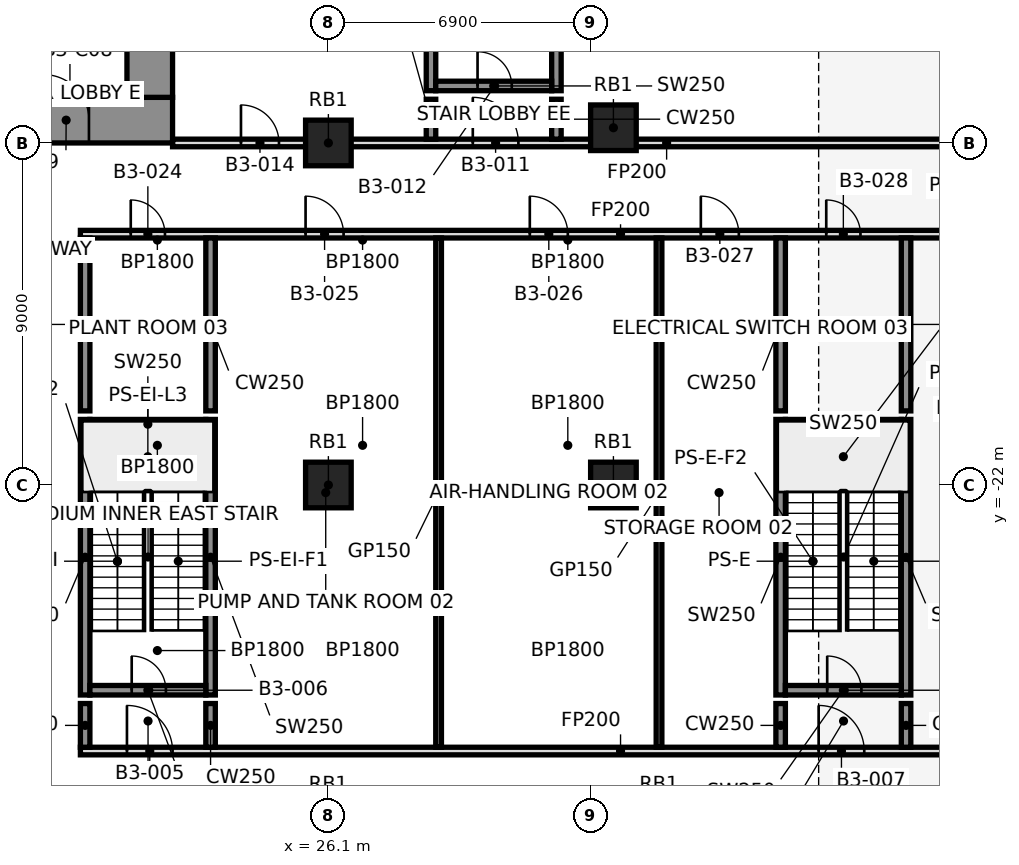
"""IFC4 building model, lengths in metres.
Left out: names, types, materials, properties, quantities, classifications, styles, units other than length and angle.
Written with IfcOpenShell. Run it as: python <this file> out.ifc"""

import sys

from ifc_helpers import new_model, si_unit, direction, frame, frame_2d, origin, origin_2d, place, context, subcontext, project, spatial, rectangle, extrude, element, fill, save


model = new_model("IFC4")
c1 = context("Model", 3, precision=1e-05, world=origin(), true_north=direction((0.0, 1.0)))
c2 = subcontext(c1, "Body", "Model", "MODEL_VIEW")
j1 = project(units=[si_unit("LENGTHUNIT", "METRE"), si_unit("PLANEANGLEUNIT", "RADIAN")], contexts=[c1])
p1 = place(None, origin())
s1 = spatial("IfcSite", under=j1, at=p1, CompositionType="ELEMENT")
p2 = place(p1, origin())
s2 = spatial("IfcBuilding", under=s1, at=p2, CompositionType="ELEMENT")
p3 = place(p2, frame((0.0, 0.0, -15.0)))
s3 = spatial("IfcBuildingStorey", under=s2, at=p3, CompositionType="ELEMENT", Elevation=-15.0)
for number, where, z_axis, x_axis in (
    (1, (33.6, -12.6, 0.0), (0.0, 0.0, 1.0), (1.0, 0.0, 0.0)),
    (2, (33.6, -22.0, 0.0), (0.0, 0.0, 1.0), (1.0, 0.0, 0.0)),
    (3, (26.1, -22.0, 0.0), (0.0, 0.0, 1.0), (1.0, 0.0, 0.0)),
    (4, (26.1, -13.0, 0.0), (0.0, 0.0, 1.0), (1.0, 0.0, 0.0)),
):
    element("IfcColumn", number, at=place(p3, frame(where, z_axis=z_axis, x_axis=x_axis)), inside=s3, PredefinedType="COLUMN", context=c2, shape_type="SweptSolid", body=[
        extrude(rectangle(XDim=1.2, YDim=1.2, at=origin_2d()), origin(), (0.0, 0.0, 1.0), 5.0),
    ])
for number, where, z_axis, x_axis in (
    (5, (28.8, -11.625, 0.0), (0.0, 0.0, 1.0), (0.0, 1.0, 0.0)),
    (6, (32.1, -11.625, 0.0), (0.0, 0.0, 1.0), (0.0, 1.0, 0.0)),
):
    element("IfcWall", number, at=place(p3, frame(where, z_axis=z_axis, x_axis=x_axis)), inside=s3, PredefinedType="SHEAR", context=c2, shape_type="SweptSolid", body=[
        extrude(rectangle(XDim=7.25, YDim=0.25, at=frame_2d((3.625, 0.0))), origin(), (0.0, 0.0, 1.0), 5.0),
    ])
p4 = place(p3, frame((28.925, -11.5, 0.0), z_axis=(0.0, 0.0, 1.0), x_axis=(1.0, 0.0, 0.0)))
e7 = element("IfcWall", 7, at=p4, inside=s3, PredefinedType="SHEAR", context=c2, shape_type="SweptSolid", body=[
    extrude(rectangle(XDim=3.05, YDim=0.25, at=frame_2d((1.525, 0.0))), origin(), (0.0, 0.0, 1.0), 5.0),
])
p5 = place(p4, frame((1.1, 0.0, 0.0)))
e8 = element("IfcOpeningElement", 8, at=p5, cuts=e7, PredefinedType="OPENING", context=c2, shape_type="SweptSolid", body=[
    extrude(rectangle(XDim=0.9, YDim=2.1, at=frame_2d((0.45, 1.05))), frame((0.0, 0.137, 0.0), z_axis=(0.0, -1.0, 0.0), x_axis=(1.0, 0.0, 0.0)), (0.0, 0.0, 1.0), 0.274),
])
for number, where, z_axis, x_axis in (
    (9, (19.7, -27.525, 0.0), (0.0, 0.0, 1.0), (0.0, 1.0, 0.0)),
    (10, (23.0, -27.525, 0.0), (0.0, 0.0, 1.0), (0.0, 1.0, 0.0)),
):
    element("IfcWall", number, at=place(p3, frame(where, z_axis=z_axis, x_axis=x_axis)), inside=s3, PredefinedType="SHEAR", context=c2, shape_type="SweptSolid", body=[
        extrude(rectangle(XDim=7.25, YDim=0.25, at=frame_2d((3.625, 0.0))), origin(), (0.0, 0.0, 1.0), 5.0),
    ])
p6 = place(p3, frame((19.825, -27.4, 0.0), z_axis=(0.0, 0.0, 1.0), x_axis=(1.0, 0.0, 0.0)))
e11 = element("IfcWall", 11, at=p6, inside=s3, PredefinedType="SHEAR", context=c2, shape_type="SweptSolid", body=[
    extrude(rectangle(XDim=3.05, YDim=0.25, at=frame_2d((1.525, 0.0))), origin(), (0.0, 0.0, 1.0), 5.0),
])
p7 = place(p6, frame((1.1, 0.0, 0.0)))
e12 = element("IfcOpeningElement", 12, at=p7, cuts=e11, PredefinedType="OPENING", context=c2, shape_type="SweptSolid", body=[
    extrude(rectangle(XDim=0.9, YDim=2.1, at=frame_2d((0.45, 1.05))), frame((0.0, 0.137, 0.0), z_axis=(0.0, -1.0, 0.0), x_axis=(1.0, 0.0, 0.0)), (0.0, 0.0, 1.0), 0.274),
])
p8 = place(p3, frame((19.825, -20.4, 0.0), z_axis=(0.0, 0.0, 1.0), x_axis=(1.0, 0.0, 0.0)))
e13 = element("IfcWall", 13, at=p8, inside=s3, PredefinedType="SHEAR", context=c2, shape_type="SweptSolid", body=[
    extrude(rectangle(XDim=3.05, YDim=0.25, at=frame_2d((1.525, 0.0))), origin(), (0.0, 0.0, 1.0), 5.0),
])
for number, where, z_axis, x_axis in (
    (14, (38.0, -27.525, 0.0), (0.0, 0.0, 1.0), (0.0, 1.0, 0.0)),
    (15, (41.3, -27.525, 0.0), (0.0, 0.0, 1.0), (0.0, 1.0, 0.0)),
):
    element("IfcWall", number, at=place(p3, frame(where, z_axis=z_axis, x_axis=x_axis)), inside=s3, PredefinedType="SHEAR", context=c2, shape_type="SweptSolid", body=[
        extrude(rectangle(XDim=7.25, YDim=0.25, at=frame_2d((3.625, 0.0))), origin(), (0.0, 0.0, 1.0), 5.0),
    ])
p9 = place(p3, frame((38.125, -27.4, 0.0), z_axis=(0.0, 0.0, 1.0), x_axis=(1.0, 0.0, 0.0)))
e16 = element("IfcWall", 16, at=p9, inside=s3, PredefinedType="SHEAR", context=c2, shape_type="SweptSolid", body=[
    extrude(rectangle(XDim=3.05, YDim=0.25, at=frame_2d((1.525, 0.0))), origin(), (0.0, 0.0, 1.0), 5.0),
])
p10 = place(p9, frame((1.1, 0.0, 0.0)))
e17 = element("IfcOpeningElement", 17, at=p10, cuts=e16, PredefinedType="OPENING", context=c2, shape_type="SweptSolid", body=[
    extrude(rectangle(XDim=0.9, YDim=2.1, at=frame_2d((0.45, 1.05))), frame((0.0, 0.137, 0.0), z_axis=(0.0, -1.0, 0.0), x_axis=(1.0, 0.0, 0.0)), (0.0, 0.0, 1.0), 0.274),
])
p11 = place(p3, frame((38.125, -20.4, 0.0), z_axis=(0.0, 0.0, 1.0), x_axis=(1.0, 0.0, 0.0)))
e18 = element("IfcWall", 18, at=p11, inside=s3, PredefinedType="SHEAR", context=c2, shape_type="SweptSolid", body=[
    extrude(rectangle(XDim=3.05, YDim=0.25, at=frame_2d((1.525, 0.0))), origin(), (0.0, 0.0, 1.0), 5.0),
])
p12 = place(p3, frame((19.575, -29.0, 0.0), z_axis=(0.0, 0.0, 1.0), x_axis=(1.0, 0.0, 0.0)))
e19 = element("IfcWall", 19, at=p12, inside=s3, PredefinedType="PARTITIONING", context=c2, shape_type="SweptSolid", body=[
    extrude(rectangle(XDim=28.425, YDim=0.2, at=frame_2d((14.212, 0.0))), origin(), (0.0, 0.0, 1.0), 4.7),
])
p13 = place(p12, frame((1.225, 0.0, 0.0)))
e20 = element("IfcOpeningElement", 20, at=p13, cuts=e19, PredefinedType="OPENING", context=c2, shape_type="SweptSolid", body=[
    extrude(rectangle(XDim=1.2, YDim=2.1, at=frame_2d((0.6, 1.05))), frame((0.0, 0.112, 0.0), z_axis=(0.0, -1.0, 0.0), x_axis=(1.0, 0.0, 0.0)), (0.0, 0.0, 1.0), 0.224),
])
p14 = place(p12, frame((19.425, 0.0, 0.0)))
e21 = element("IfcOpeningElement", 21, at=p14, cuts=e19, PredefinedType="OPENING", context=c2, shape_type="SweptSolid", body=[
    extrude(rectangle(XDim=1.2, YDim=2.1, at=frame_2d((0.6, 1.05))), frame((0.0, 0.112, 0.0), z_axis=(0.0, -1.0, 0.0), x_axis=(1.0, 0.0, 0.0)), (0.0, 0.0, 1.0), 0.224),
])
p15 = place(p3, frame((19.575, -15.4, 0.0), z_axis=(0.0, 0.0, 1.0), x_axis=(1.0, 0.0, 0.0)))
e22 = element("IfcWall", 22, at=p15, inside=s3, PredefinedType="PARTITIONING", context=c2, shape_type="SweptSolid", body=[
    extrude(rectangle(XDim=28.425, YDim=0.2, at=frame_2d((14.212, 0.0))), origin(), (0.0, 0.0, 1.0), 4.7),
])
p16 = place(p15, frame((1.325, 0.0, 0.0)))
e23 = element("IfcOpeningElement", 23, at=p16, cuts=e22, PredefinedType="OPENING", context=c2, shape_type="SweptSolid", body=[
    extrude(rectangle(XDim=0.9, YDim=2.1, at=frame_2d((0.45, 1.05))), frame((0.0, 0.112, 0.0), z_axis=(0.0, -1.0, 0.0), x_axis=(1.0, 0.0, 0.0)), (0.0, 0.0, 1.0), 0.224),
])
p17 = place(p15, frame((5.925, 0.0, 0.0)))
e24 = element("IfcOpeningElement", 24, at=p17, cuts=e22, PredefinedType="OPENING", context=c2, shape_type="SweptSolid", body=[
    extrude(rectangle(XDim=1.0, YDim=2.1, at=frame_2d((0.5, 1.05))), frame((0.0, 0.112, 0.0), z_axis=(0.0, -1.0, 0.0), x_axis=(1.0, 0.0, 0.0)), (0.0, 0.0, 1.0), 0.224),
])
p18 = place(p15, frame((11.825, 0.0, 0.0)))
e25 = element("IfcOpeningElement", 25, at=p18, cuts=e22, PredefinedType="OPENING", context=c2, shape_type="SweptSolid", body=[
    extrude(rectangle(XDim=1.0, YDim=2.1, at=frame_2d((0.5, 1.05))), frame((0.0, 0.112, 0.0), z_axis=(0.0, -1.0, 0.0), x_axis=(1.0, 0.0, 0.0)), (0.0, 0.0, 1.0), 0.224),
])
p19 = place(p15, frame((16.325, 0.0, 0.0)))
e26 = element("IfcOpeningElement", 26, at=p19, cuts=e22, PredefinedType="OPENING", context=c2, shape_type="SweptSolid", body=[
    extrude(rectangle(XDim=1.0, YDim=2.1, at=frame_2d((0.5, 1.05))), frame((0.0, 0.112, 0.0), z_axis=(0.0, -1.0, 0.0), x_axis=(1.0, 0.0, 0.0)), (0.0, 0.0, 1.0), 0.224),
])
p20 = place(p15, frame((19.625, 0.0, 0.0)))
e27 = element("IfcOpeningElement", 27, at=p20, cuts=e22, PredefinedType="OPENING", context=c2, shape_type="SweptSolid", body=[
    extrude(rectangle(XDim=0.9, YDim=2.1, at=frame_2d((0.45, 1.05))), frame((0.0, 0.112, 0.0), z_axis=(0.0, -1.0, 0.0), x_axis=(1.0, 0.0, 0.0)), (0.0, 0.0, 1.0), 0.224),
])
p21 = place(p15, frame((24.525, 0.0, 0.0)))
e28 = element("IfcOpeningElement", 28, at=p21, cuts=e22, PredefinedType="OPENING", context=c2, shape_type="SweptSolid", body=[
    extrude(rectangle(XDim=1.0, YDim=2.1, at=frame_2d((0.5, 1.05))), frame((0.0, 0.112, 0.0), z_axis=(0.0, -1.0, 0.0), x_axis=(1.0, 0.0, 0.0)), (0.0, 0.0, 1.0), 0.224),
])
p22 = place(p3, frame((22.0, -13.0, 0.0), z_axis=(0.0, 0.0, 1.0), x_axis=(1.0, 0.0, 0.0)))
e29 = element("IfcWall", 29, at=p22, inside=s3, PredefinedType="PARTITIONING", context=c2, shape_type="SweptSolid", body=[
    extrude(rectangle(XDim=26.0, YDim=0.2, at=frame_2d((13.0, 0.0))), origin(), (0.0, 0.0, 1.0), 4.7),
])
p23 = place(p22, frame((7.9, 0.0, 0.0)))
e30 = element("IfcOpeningElement", 30, at=p23, cuts=e29, PredefinedType="OPENING", context=c2, shape_type="SweptSolid", body=[
    extrude(rectangle(XDim=1.2, YDim=2.1, at=frame_2d((0.6, 1.05))), frame((0.0, 0.112, 0.0), z_axis=(0.0, -1.0, 0.0), x_axis=(1.0, 0.0, 0.0)), (0.0, 0.0, 1.0), 0.224),
])
p24 = place(p22, frame((1.8, 0.0, 0.0)))
e31 = element("IfcOpeningElement", 31, at=p24, cuts=e29, PredefinedType="OPENING", context=c2, shape_type="SweptSolid", body=[
    extrude(rectangle(XDim=1.0, YDim=2.1, at=frame_2d((0.5, 1.05))), frame((0.0, 0.112, 0.0), z_axis=(0.0, -1.0, 0.0), x_axis=(1.0, 0.0, 0.0)), (0.0, 0.0, 1.0), 0.224),
])
p25 = place(p3, frame((19.7, -28.9, 0.0), z_axis=(0.0, 0.0, 1.0), x_axis=(0.0, 1.0, 0.0)))
e32 = element("IfcWall", 32, at=p25, inside=s3, PredefinedType="SHEAR", context=c2, shape_type="SweptSolid", body=[
    extrude(rectangle(XDim=1.15, YDim=0.25, at=frame_2d((0.575, 0.0))), origin(), (0.0, 0.0, 1.0), 5.0),
])
p26 = place(p3, frame((19.7, -20.05, 0.0), z_axis=(0.0, 0.0, 1.0), x_axis=(0.0, 1.0, 0.0)))
e33 = element("IfcWall", 33, at=p26, inside=s3, PredefinedType="SHEAR", context=c2, shape_type="SweptSolid", body=[
    extrude(rectangle(XDim=4.55, YDim=0.25, at=frame_2d((2.275, 0.0))), origin(), (0.0, 0.0, 1.0), 5.0),
])
p27 = place(p3, frame((23.0, -28.9, 0.0), z_axis=(0.0, 0.0, 1.0), x_axis=(0.0, 1.0, 0.0)))
e34 = element("IfcWall", 34, at=p27, inside=s3, PredefinedType="SHEAR", context=c2, shape_type="SweptSolid", body=[
    extrude(rectangle(XDim=1.15, YDim=0.25, at=frame_2d((0.575, 0.0))), origin(), (0.0, 0.0, 1.0), 5.0),
])
p28 = place(p3, frame((23.0, -20.05, 0.0), z_axis=(0.0, 0.0, 1.0), x_axis=(0.0, 1.0, 0.0)))
e35 = element("IfcWall", 35, at=p28, inside=s3, PredefinedType="SHEAR", context=c2, shape_type="SweptSolid", body=[
    extrude(rectangle(XDim=4.55, YDim=0.25, at=frame_2d((2.275, 0.0))), origin(), (0.0, 0.0, 1.0), 5.0),
])
p29 = place(p3, frame((28.8, -12.9, 0.0), z_axis=(0.0, 0.0, 1.0), x_axis=(0.0, 1.0, 0.0)))
e36 = element("IfcWall", 36, at=p29, inside=s3, PredefinedType="SHEAR", context=c2, shape_type="SweptSolid", body=[
    extrude(rectangle(XDim=1.05, YDim=0.25, at=frame_2d((0.525, 0.0))), origin(), (0.0, 0.0, 1.0), 5.0),
])
p30 = place(p3, frame((29.0, -28.9, 0.0), z_axis=(0.0, 0.0, 1.0), x_axis=(0.0, 1.0, 0.0)))
e37 = element("IfcWall", 37, at=p30, inside=s3, PredefinedType="PARTITIONING", context=c2, shape_type="SweptSolid", body=[
    extrude(rectangle(XDim=13.4, YDim=0.15, at=frame_2d((6.7, 0.0))), origin(), (0.0, 0.0, 1.0), 4.7),
])
p31 = place(p3, frame((32.1, -12.9, 0.0), z_axis=(0.0, 0.0, 1.0), x_axis=(0.0, 1.0, 0.0)))
e38 = element("IfcWall", 38, at=p31, inside=s3, PredefinedType="SHEAR", context=c2, shape_type="SweptSolid", body=[
    extrude(rectangle(XDim=1.05, YDim=0.25, at=frame_2d((0.525, 0.0))), origin(), (0.0, 0.0, 1.0), 5.0),
])
p32 = place(p3, frame((34.8, -28.9, 0.0), z_axis=(0.0, 0.0, 1.0), x_axis=(0.0, 1.0, 0.0)))
e39 = element("IfcWall", 39, at=p32, inside=s3, PredefinedType="PARTITIONING", context=c2, shape_type="SweptSolid", body=[
    extrude(rectangle(XDim=13.4, YDim=0.15, at=frame_2d((6.7, 0.0))), origin(), (0.0, 0.0, 1.0), 4.7),
])
p33 = place(p3, frame((38.0, -28.9, 0.0), z_axis=(0.0, 0.0, 1.0), x_axis=(0.0, 1.0, 0.0)))
e40 = element("IfcWall", 40, at=p33, inside=s3, PredefinedType="SHEAR", context=c2, shape_type="SweptSolid", body=[
    extrude(rectangle(XDim=1.15, YDim=0.25, at=frame_2d((0.575, 0.0))), origin(), (0.0, 0.0, 1.0), 5.0),
])
p34 = place(p3, frame((38.0, -20.05, 0.0), z_axis=(0.0, 0.0, 1.0), x_axis=(0.0, 1.0, 0.0)))
e41 = element("IfcWall", 41, at=p34, inside=s3, PredefinedType="SHEAR", context=c2, shape_type="SweptSolid", body=[
    extrude(rectangle(XDim=4.55, YDim=0.25, at=frame_2d((2.275, 0.0))), origin(), (0.0, 0.0, 1.0), 5.0),
])
p35 = place(p3, frame((41.3, -28.9, 0.0), z_axis=(0.0, 0.0, 1.0), x_axis=(0.0, 1.0, 0.0)))
e42 = element("IfcWall", 42, at=p35, inside=s3, PredefinedType="SHEAR", context=c2, shape_type="SweptSolid", body=[
    extrude(rectangle(XDim=1.15, YDim=0.25, at=frame_2d((0.575, 0.0))), origin(), (0.0, 0.0, 1.0), 5.0),
])
p36 = place(p3, frame((41.3, -20.05, 0.0), z_axis=(0.0, 0.0, 1.0), x_axis=(0.0, 1.0, 0.0)))
e43 = element("IfcWall", 43, at=p36, inside=s3, PredefinedType="SHEAR", context=c2, shape_type="SweptSolid", body=[
    extrude(rectangle(XDim=4.55, YDim=0.25, at=frame_2d((2.275, 0.0))), origin(), (0.0, 0.0, 1.0), 5.0),
])
p37 = place(p3, frame((-22.0, -12.4, 0.0), z_axis=(0.0, 0.0, 1.0), x_axis=(1.0, 0.0, 0.0)))
e44 = element("IfcWall", 44, at=p37, inside=s3, PredefinedType="SHEAR", context=c2, shape_type="SweptSolid", body=[
    extrude(rectangle(XDim=44.0, YDim=1.2, at=frame_2d((22.0, 0.0))), origin(), (0.0, 0.0, 1.0), 5.0),
])
p38 = place(p37, frame((2.2, 0.0, 0.0)))
e45 = element("IfcOpeningElement", 45, at=p38, cuts=e44, PredefinedType="OPENING", context=c2, shape_type="SweptSolid", body=[
    extrude(rectangle(XDim=1.2, YDim=2.1, at=frame_2d((0.6, 1.05))), frame((0.0, 0.612, 0.0), z_axis=(0.0, -1.0, 0.0), x_axis=(1.0, 0.0, 0.0)), (0.0, 0.0, 1.0), 1.224),
])
p39 = place(p37, frame((21.4, 0.0, 0.0)))
e46 = element("IfcOpeningElement", 46, at=p39, cuts=e44, PredefinedType="OPENING", context=c2, shape_type="SweptSolid", body=[
    extrude(rectangle(XDim=1.2, YDim=2.1, at=frame_2d((0.6, 1.05))), frame((0.0, 0.612, 0.0), z_axis=(0.0, -1.0, 0.0), x_axis=(1.0, 0.0, 0.0)), (0.0, 0.0, 1.0), 1.224),
])
p40 = place(p37, frame((40.6, 0.0, 0.0)))
e47 = element("IfcOpeningElement", 47, at=p40, cuts=e44, PredefinedType="OPENING", context=c2, shape_type="SweptSolid", body=[
    extrude(rectangle(XDim=1.2, YDim=2.1, at=frame_2d((0.6, 1.05))), frame((0.0, 0.612, 0.0), z_axis=(0.0, -1.0, 0.0), x_axis=(1.0, 0.0, 0.0)), (0.0, 0.0, 1.0), 1.224),
])
p41 = place(p37, frame((16.0, 0.0, 0.0)))
e48 = element("IfcOpeningElement", 48, at=p41, cuts=e44, PredefinedType="OPENING", context=c2, shape_type="SweptSolid", body=[
    extrude(rectangle(XDim=1.8, YDim=2.1, at=frame_2d((0.9, 1.05))), frame((0.0, 0.612, 0.0), z_axis=(0.0, -1.0, 0.0), x_axis=(1.0, 0.0, 0.0)), (0.0, 0.0, 1.0), 1.224),
])
p42 = place(p37, frame((6.3, 0.0, 0.0)))
e49 = element("IfcOpeningElement", 49, at=p42, cuts=e44, PredefinedType="OPENING", context=c2, shape_type="SweptSolid", body=[
    extrude(rectangle(XDim=1.2, YDim=2.1, at=frame_2d((0.6, 1.05))), frame((0.0, 0.612, 0.0), z_axis=(0.0, -1.0, 0.0), x_axis=(1.0, 0.0, 0.0)), (0.0, 0.0, 1.0), 1.224),
])
p43 = place(p37, frame((26.2, 0.0, 0.0)))
e50 = element("IfcOpeningElement", 50, at=p43, cuts=e44, PredefinedType="OPENING", context=c2, shape_type="SweptSolid", body=[
    extrude(rectangle(XDim=1.8, YDim=2.1, at=frame_2d((0.9, 1.05))), frame((0.0, 0.612, 0.0), z_axis=(0.0, -1.0, 0.0), x_axis=(1.0, 0.0, 0.0)), (0.0, 0.0, 1.0), 1.224),
])
p44 = place(p37, frame((36.5, 0.0, 0.0)))
e51 = element("IfcOpeningElement", 51, at=p44, cuts=e44, PredefinedType="OPENING", context=c2, shape_type="SweptSolid", body=[
    extrude(rectangle(XDim=1.2, YDim=2.1, at=frame_2d((0.6, 1.05))), frame((0.0, 0.612, 0.0), z_axis=(0.0, -1.0, 0.0), x_axis=(1.0, 0.0, 0.0)), (0.0, 0.0, 1.0), 1.224),
])
p45 = place(p3, frame((21.4, -11.8, 0.0), z_axis=(0.0, 0.0, 1.0), x_axis=(0.0, 1.0, 0.0)))
e52 = element("IfcWall", 52, at=p45, inside=s3, PredefinedType="SHEAR", context=c2, shape_type="SweptSolid", body=[
    extrude(rectangle(XDim=10.6, YDim=1.2, at=frame_2d((5.3, 0.0))), origin(), (0.0, 0.0, 1.0), 5.0),
])
p46 = place(p13, origin())
e53 = element("IfcDoor", 53, at=p46, inside=s3, OperationType="SINGLE_SWING_LEFT", PredefinedType="DOOR", context=c2, shape_type="SweptSolid", body=[
    extrude(rectangle(XDim=1.2, YDim=2.1, at=frame_2d((0.6, 1.05))), frame((0.0, 0.025, 0.0), z_axis=(0.0, -1.0, 0.0), x_axis=(1.0, 0.0, 0.0)), (0.0, 0.0, 1.0), 0.05),
])
fill(e20, e53)
p47 = place(p7, origin())
e54 = element("IfcDoor", 54, at=p47, inside=s3, OperationType="SINGLE_SWING_RIGHT", PredefinedType="DOOR", context=c2, shape_type="SweptSolid", body=[
    extrude(rectangle(XDim=0.9, YDim=2.1, at=frame_2d((0.45, 1.05))), frame((0.0, 0.025, 0.0), z_axis=(0.0, -1.0, 0.0), x_axis=(1.0, 0.0, 0.0)), (0.0, 0.0, 1.0), 0.05),
])
fill(e12, e54)
p48 = place(p14, origin())
e55 = element("IfcDoor", 55, at=p48, inside=s3, OperationType="SINGLE_SWING_LEFT", PredefinedType="DOOR", context=c2, shape_type="SweptSolid", body=[
    extrude(rectangle(XDim=1.2, YDim=2.1, at=frame_2d((0.6, 1.05))), frame((0.0, 0.025, 0.0), z_axis=(0.0, -1.0, 0.0), x_axis=(1.0, 0.0, 0.0)), (0.0, 0.0, 1.0), 0.05),
])
fill(e21, e55)
p49 = place(p10, origin())
e56 = element("IfcDoor", 56, at=p49, inside=s3, OperationType="SINGLE_SWING_LEFT", PredefinedType="DOOR", context=c2, shape_type="SweptSolid", body=[
    extrude(rectangle(XDim=0.9, YDim=2.1, at=frame_2d((0.45, 1.05))), frame((0.0, 0.025, 0.0), z_axis=(0.0, -1.0, 0.0), x_axis=(1.0, 0.0, 0.0)), (0.0, 0.0, 1.0), 0.05),
])
fill(e17, e56)
p50 = place(p23, origin())
e57 = element("IfcDoor", 57, at=p50, inside=s3, OperationType="SINGLE_SWING_LEFT", PredefinedType="DOOR", context=c2, shape_type="SweptSolid", body=[
    extrude(rectangle(XDim=1.2, YDim=2.1, at=frame_2d((0.6, 1.05))), frame((0.0, 0.025, 0.0), z_axis=(0.0, -1.0, 0.0), x_axis=(1.0, 0.0, 0.0)), (0.0, 0.0, 1.0), 0.05),
])
fill(e30, e57)
p51 = place(p5, origin())
e58 = element("IfcDoor", 58, at=p51, inside=s3, OperationType="SINGLE_SWING_RIGHT", PredefinedType="DOOR", context=c2, shape_type="SweptSolid", body=[
    extrude(rectangle(XDim=0.9, YDim=2.1, at=frame_2d((0.45, 1.05))), frame((0.0, 0.025, 0.0), z_axis=(0.0, -1.0, 0.0), x_axis=(1.0, 0.0, 0.0)), (0.0, 0.0, 1.0), 0.05),
])
fill(e8, e58)
p52 = place(p24, origin())
e59 = element("IfcDoor", 59, at=p52, inside=s3, OperationType="SINGLE_SWING_LEFT", PredefinedType="DOOR", context=c2, shape_type="SweptSolid", body=[
    extrude(rectangle(XDim=1.0, YDim=2.1, at=frame_2d((0.5, 1.05))), frame((0.0, 0.025, 0.0), z_axis=(0.0, -1.0, 0.0), x_axis=(1.0, 0.0, 0.0)), (0.0, 0.0, 1.0), 0.05),
])
fill(e31, e59)
p53 = place(p16, frame((0.9, 0.0, 0.0), z_axis=(0.0, 0.0, 1.0), x_axis=(-1.0, 0.0, 0.0)))
e60 = element("IfcDoor", 60, at=p53, inside=s3, OperationType="SINGLE_SWING_RIGHT", PredefinedType="DOOR", context=c2, shape_type="SweptSolid", body=[
    extrude(rectangle(XDim=0.9, YDim=2.1, at=frame_2d((0.45, 1.05))), frame((0.0, 0.025, 0.0), z_axis=(0.0, -1.0, 0.0), x_axis=(1.0, 0.0, 0.0)), (0.0, 0.0, 1.0), 0.05),
])
fill(e23, e60)
p54 = place(p17, frame((1.0, 0.0, 0.0), z_axis=(0.0, 0.0, 1.0), x_axis=(-1.0, 0.0, 0.0)))
e61 = element("IfcDoor", 61, at=p54, inside=s3, OperationType="SINGLE_SWING_LEFT", PredefinedType="DOOR", context=c2, shape_type="SweptSolid", body=[
    extrude(rectangle(XDim=1.0, YDim=2.1, at=frame_2d((0.5, 1.05))), frame((0.0, 0.025, 0.0), z_axis=(0.0, -1.0, 0.0), x_axis=(1.0, 0.0, 0.0)), (0.0, 0.0, 1.0), 0.05),
])
fill(e24, e61)
p55 = place(p18, frame((1.0, 0.0, 0.0), z_axis=(0.0, 0.0, 1.0), x_axis=(-1.0, 0.0, 0.0)))
e62 = element("IfcDoor", 62, at=p55, inside=s3, OperationType="SINGLE_SWING_RIGHT", PredefinedType="DOOR", context=c2, shape_type="SweptSolid", body=[
    extrude(rectangle(XDim=1.0, YDim=2.1, at=frame_2d((0.5, 1.05))), frame((0.0, 0.025, 0.0), z_axis=(0.0, -1.0, 0.0), x_axis=(1.0, 0.0, 0.0)), (0.0, 0.0, 1.0), 0.05),
])
fill(e25, e62)
p56 = place(p19, frame((1.0, 0.0, 0.0), z_axis=(0.0, 0.0, 1.0), x_axis=(-1.0, 0.0, 0.0)))
e63 = element("IfcDoor", 63, at=p56, inside=s3, OperationType="SINGLE_SWING_RIGHT", PredefinedType="DOOR", context=c2, shape_type="SweptSolid", body=[
    extrude(rectangle(XDim=1.0, YDim=2.1, at=frame_2d((0.5, 1.05))), frame((0.0, 0.025, 0.0), z_axis=(0.0, -1.0, 0.0), x_axis=(1.0, 0.0, 0.0)), (0.0, 0.0, 1.0), 0.05),
])
fill(e26, e63)
p57 = place(p20, frame((0.9, 0.0, 0.0), z_axis=(0.0, 0.0, 1.0), x_axis=(-1.0, 0.0, 0.0)))
e64 = element("IfcDoor", 64, at=p57, inside=s3, OperationType="SINGLE_SWING_LEFT", PredefinedType="DOOR", context=c2, shape_type="SweptSolid", body=[
    extrude(rectangle(XDim=0.9, YDim=2.1, at=frame_2d((0.45, 1.05))), frame((0.0, 0.025, 0.0), z_axis=(0.0, -1.0, 0.0), x_axis=(1.0, 0.0, 0.0)), (0.0, 0.0, 1.0), 0.05),
])
fill(e27, e64)
p58 = place(p40, frame((1.2, 0.0, 0.0), z_axis=(0.0, 0.0, 1.0), x_axis=(-1.0, 0.0, 0.0)))
e65 = element("IfcDoor", 65, at=p58, inside=s3, OperationType="SINGLE_SWING_RIGHT", PredefinedType="DOOR", context=c2, shape_type="SweptSolid", body=[
    extrude(rectangle(XDim=1.2, YDim=2.1, at=frame_2d((0.6, 1.05))), frame((0.0, 0.025, 0.0), z_axis=(0.0, -1.0, 0.0), x_axis=(1.0, 0.0, 0.0)), (0.0, 0.0, 1.0), 0.05),
])
fill(e47, e65)
save(model, sys.argv[1])
